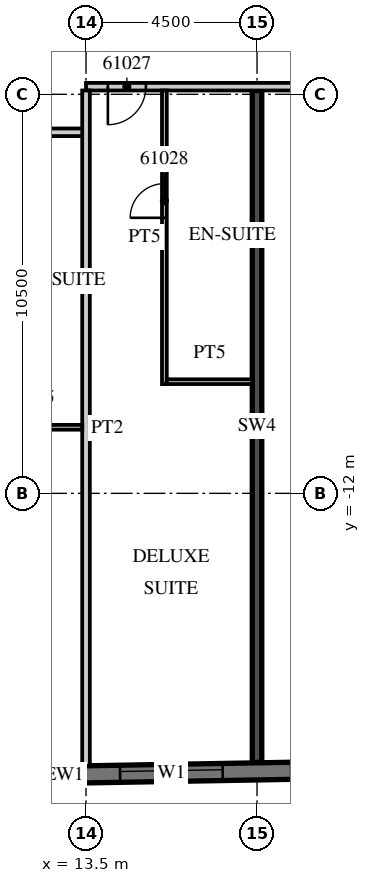
"""IFC4 building model, lengths in metres.
Left out: names, types, materials, properties, quantities, classifications, styles, units other than length and angle.
Written with IfcOpenShell. Run it as: python <this file> out.ifc"""

import sys

from ifc_helpers import new_model, si_unit, direction, frame, frame_2d, origin, place, context, subcontext, project, spatial, rectangle, extrude, element, fill, save


model = new_model("IFC4")
c1 = context("Model", 3, precision=1e-05, world=origin(), true_north=direction((0.0, 1.0)))
c2 = subcontext(c1, "Body", "Model", "MODEL_VIEW")
j1 = project(units=[si_unit("LENGTHUNIT", "METRE"), si_unit("PLANEANGLEUNIT", "RADIAN")], contexts=[c1])
p1 = place(None, origin())
s1 = spatial("IfcSite", under=j1, at=p1, CompositionType="ELEMENT")
p2 = place(p1, origin())
s2 = spatial("IfcBuilding", under=s1, at=p2, CompositionType="ELEMENT")
p3 = place(p2, frame((0.0, 0.0, 247.4)))
s3 = spatial("IfcBuildingStorey", under=s2, at=p3, CompositionType="ELEMENT", Elevation=247.4)
p4 = place(p3, frame((18.0, -19.079, 0.0), z_axis=(0.0, 0.0, 1.0), x_axis=(0.0, 1.0, 0.0)))
e1 = element("IfcWall", 1, at=p4, inside=s3, PredefinedType="SHEAR", context=c2, shape_type="SweptSolid", body=[
    extrude(rectangle(XDim=17.679, YDim=0.25, at=frame_2d((8.84, 0.0))), origin(), (0.0, 0.0, 1.0), 3.3),
])
p5 = place(p3, frame((-13.504, -19.866, 0.0), z_axis=(0.0, 0.0, 1.0), x_axis=(0.999847672978, 0.017453676992, 0.0)))
e2 = element("IfcWall", 2, at=p5, inside=s3, PredefinedType="SOLIDWALL", context=c2, shape_type="SweptSolid", body=[
    extrude(rectangle(XDim=52.86, YDim=0.45, at=frame_2d((26.43, 0.0))), origin(), (0.0, 0.0, 1.0), 3.02),
])
p6 = place(p5, frame((0.9, 0.0, 0.45)))
e3 = element("IfcOpeningElement", 3, at=p6, cuts=e2, PredefinedType="OPENING", context=c2, shape_type="SweptSolid", body=[
    extrude(rectangle(XDim=2.7, YDim=2.25, at=frame_2d((1.35, 1.125))), frame((0.0, 0.235, 0.0), z_axis=(0.0, -1.0, 0.0), x_axis=(1.0, 0.0, 0.0)), (0.0, 0.0, 1.0), 0.47),
])
p7 = place(p5, frame((5.401, 0.0, 0.45)))
e4 = element("IfcOpeningElement", 4, at=p7, cuts=e2, PredefinedType="OPENING", context=c2, shape_type="SweptSolid", body=[
    extrude(rectangle(XDim=2.7, YDim=2.25, at=frame_2d((1.35, 1.125))), frame((0.0, 0.235, 0.0), z_axis=(0.0, -1.0, 0.0), x_axis=(1.0, 0.0, 0.0)), (0.0, 0.0, 1.0), 0.47),
])
p8 = place(p5, frame((9.902, 0.0, 0.45)))
e5 = element("IfcOpeningElement", 5, at=p8, cuts=e2, PredefinedType="OPENING", context=c2, shape_type="SweptSolid", body=[
    extrude(rectangle(XDim=2.7, YDim=2.25, at=frame_2d((1.35, 1.125))), frame((0.0, 0.235, 0.0), z_axis=(0.0, -1.0, 0.0), x_axis=(1.0, 0.0, 0.0)), (0.0, 0.0, 1.0), 0.47),
])
p9 = place(p5, frame((14.402, 0.0, 0.45)))
e6 = element("IfcOpeningElement", 6, at=p9, cuts=e2, PredefinedType="OPENING", context=c2, shape_type="SweptSolid", body=[
    extrude(rectangle(XDim=2.7, YDim=2.25, at=frame_2d((1.35, 1.125))), frame((0.0, 0.235, 0.0), z_axis=(0.0, -1.0, 0.0), x_axis=(1.0, 0.0, 0.0)), (0.0, 0.0, 1.0), 0.47),
])
p10 = place(p5, frame((18.903, 0.0, 0.45)))
e7 = element("IfcOpeningElement", 7, at=p10, cuts=e2, PredefinedType="OPENING", context=c2, shape_type="SweptSolid", body=[
    extrude(rectangle(XDim=2.7, YDim=2.25, at=frame_2d((1.35, 1.125))), frame((0.0, 0.235, 0.0), z_axis=(0.0, -1.0, 0.0), x_axis=(1.0, 0.0, 0.0)), (0.0, 0.0, 1.0), 0.47),
])
p11 = place(p5, frame((23.404, 0.0, 0.45)))
e8 = element("IfcOpeningElement", 8, at=p11, cuts=e2, PredefinedType="OPENING", context=c2, shape_type="SweptSolid", body=[
    extrude(rectangle(XDim=2.7, YDim=2.25, at=frame_2d((1.35, 1.125))), frame((0.0, 0.235, 0.0), z_axis=(0.0, -1.0, 0.0), x_axis=(1.0, 0.0, 0.0)), (0.0, 0.0, 1.0), 0.47),
])
p12 = place(p5, frame((27.904, 0.0, 0.45)))
e9 = element("IfcOpeningElement", 9, at=p12, cuts=e2, PredefinedType="OPENING", context=c2, shape_type="SweptSolid", body=[
    extrude(rectangle(XDim=2.7, YDim=2.25, at=frame_2d((1.35, 1.125))), frame((0.0, 0.235, 0.0), z_axis=(0.0, -1.0, 0.0), x_axis=(1.0, 0.0, 0.0)), (0.0, 0.0, 1.0), 0.47),
])
p13 = place(p5, frame((32.405, 0.0, 0.45)))
e10 = element("IfcOpeningElement", 10, at=p13, cuts=e2, PredefinedType="OPENING", context=c2, shape_type="SweptSolid", body=[
    extrude(rectangle(XDim=2.7, YDim=2.25, at=frame_2d((1.35, 1.125))), frame((0.0, 0.235, 0.0), z_axis=(0.0, -1.0, 0.0), x_axis=(1.0, 0.0, 0.0)), (0.0, 0.0, 1.0), 0.47),
])
p14 = place(p5, frame((36.906, 0.0, 0.45)))
e11 = element("IfcOpeningElement", 11, at=p14, cuts=e2, PredefinedType="OPENING", context=c2, shape_type="SweptSolid", body=[
    extrude(rectangle(XDim=2.7, YDim=2.25, at=frame_2d((1.35, 1.125))), frame((0.0, 0.235, 0.0), z_axis=(0.0, -1.0, 0.0), x_axis=(1.0, 0.0, 0.0)), (0.0, 0.0, 1.0), 0.47),
])
p15 = place(p5, frame((41.406, 0.0, 0.45)))
e12 = element("IfcOpeningElement", 12, at=p15, cuts=e2, PredefinedType="OPENING", context=c2, shape_type="SweptSolid", body=[
    extrude(rectangle(XDim=2.7, YDim=2.25, at=frame_2d((1.35, 1.125))), frame((0.0, 0.235, 0.0), z_axis=(0.0, -1.0, 0.0), x_axis=(1.0, 0.0, 0.0)), (0.0, 0.0, 1.0), 0.47),
])
p16 = place(p5, frame((45.907, 0.0, 0.45)))
e13 = element("IfcOpeningElement", 13, at=p16, cuts=e2, PredefinedType="OPENING", context=c2, shape_type="SweptSolid", body=[
    extrude(rectangle(XDim=2.7, YDim=2.25, at=frame_2d((1.35, 1.125))), frame((0.0, 0.235, 0.0), z_axis=(0.0, -1.0, 0.0), x_axis=(1.0, 0.0, 0.0)), (0.0, 0.0, 1.0), 0.47),
])
p17 = place(p3, frame((-13.5, -2.5, 0.0), z_axis=(0.0, 0.0, 1.0), x_axis=(1.0, 0.0, 0.0)))
e14 = element("IfcWall", 14, at=p17, inside=s3, PredefinedType="PARTITIONING", context=c2, shape_type="SweptSolid", body=[
    extrude(rectangle(XDim=27.0, YDim=0.2, at=frame_2d((13.5, 0.0))), origin(), (0.0, 0.0, 1.0), 3.02),
])
p18 = place(p17, frame((2.925, 0.0, 0.0)))
e15 = element("IfcOpeningElement", 15, at=p18, cuts=e14, PredefinedType="OPENING", context=c2, shape_type="SweptSolid", body=[
    extrude(rectangle(XDim=1.0, YDim=2.1, at=frame_2d((0.5, 1.05))), frame((0.0, 0.11, 0.0), z_axis=(0.0, -1.0, 0.0), x_axis=(1.0, 0.0, 0.0)), (0.0, 0.0, 1.0), 0.22),
])
p19 = place(p17, frame((5.075, 0.0, 0.0)))
e16 = element("IfcOpeningElement", 16, at=p19, cuts=e14, PredefinedType="OPENING", context=c2, shape_type="SweptSolid", body=[
    extrude(rectangle(XDim=1.0, YDim=2.1, at=frame_2d((0.5, 1.05))), frame((0.0, 0.11, 0.0), z_axis=(0.0, -1.0, 0.0), x_axis=(1.0, 0.0, 0.0)), (0.0, 0.0, 1.0), 0.22),
])
p20 = place(p17, frame((9.55, 0.0, 0.0)))
e17 = element("IfcOpeningElement", 17, at=p20, cuts=e14, PredefinedType="OPENING", context=c2, shape_type="SweptSolid", body=[
    extrude(rectangle(XDim=1.0, YDim=2.1, at=frame_2d((0.5, 1.05))), frame((0.0, 0.11, 0.0), z_axis=(0.0, -1.0, 0.0), x_axis=(1.0, 0.0, 0.0)), (0.0, 0.0, 1.0), 0.22),
])
p21 = place(p17, frame((14.075, 0.0, 0.0)))
e18 = element("IfcOpeningElement", 18, at=p21, cuts=e14, PredefinedType="OPENING", context=c2, shape_type="SweptSolid", body=[
    extrude(rectangle(XDim=1.0, YDim=2.1, at=frame_2d((0.5, 1.05))), frame((0.0, 0.11, 0.0), z_axis=(0.0, -1.0, 0.0), x_axis=(1.0, 0.0, 0.0)), (0.0, 0.0, 1.0), 0.22),
])
p22 = place(p17, frame((20.925, 0.0, 0.0)))
e19 = element("IfcOpeningElement", 19, at=p22, cuts=e14, PredefinedType="OPENING", context=c2, shape_type="SweptSolid", body=[
    extrude(rectangle(XDim=1.0, YDim=2.1, at=frame_2d((0.5, 1.05))), frame((0.0, 0.11, 0.0), z_axis=(0.0, -1.0, 0.0), x_axis=(1.0, 0.0, 0.0)), (0.0, 0.0, 1.0), 0.22),
])
p23 = place(p17, frame((23.075, 0.0, 0.0)))
e20 = element("IfcOpeningElement", 20, at=p23, cuts=e14, PredefinedType="OPENING", context=c2, shape_type="SweptSolid", body=[
    extrude(rectangle(XDim=1.0, YDim=2.1, at=frame_2d((0.5, 1.05))), frame((0.0, 0.11, 0.0), z_axis=(0.0, -1.0, 0.0), x_axis=(1.0, 0.0, 0.0)), (0.0, 0.0, 1.0), 0.22),
])
p24 = place(p3, frame((13.5, -1.3, 0.0), z_axis=(0.0, 0.0, 1.0), x_axis=(1.0, 0.0, 0.0)))
e21 = element("IfcWall", 21, at=p24, inside=s3, PredefinedType="PARTITIONING", context=c2, shape_type="SweptSolid", body=[
    extrude(rectangle(XDim=29.091, YDim=0.2, at=frame_2d((14.545, 0.0))), origin(), (0.0, 0.0, 1.0), 3.02),
])
p25 = place(p24, frame((0.575, 0.0, 0.0)))
e22 = element("IfcOpeningElement", 22, at=p25, cuts=e21, PredefinedType="OPENING", context=c2, shape_type="SweptSolid", body=[
    extrude(rectangle(XDim=1.0, YDim=2.1, at=frame_2d((0.5, 1.05))), frame((0.0, 0.11, 0.0), z_axis=(0.0, -1.0, 0.0), x_axis=(1.0, 0.0, 0.0)), (0.0, 0.0, 1.0), 0.22),
])
p26 = place(p24, frame((6.938, 0.0, 0.0)))
e23 = element("IfcOpeningElement", 23, at=p26, cuts=e21, PredefinedType="OPENING", context=c2, shape_type="SweptSolid", body=[
    extrude(rectangle(XDim=1.2, YDim=2.1, at=frame_2d((0.6, 1.05))), frame((0.0, 0.11, 0.0), z_axis=(0.0, -1.0, 0.0), x_axis=(1.0, 0.0, 0.0)), (0.0, 0.0, 1.0), 0.22),
])
p27 = place(p24, frame((15.938, 0.0, 0.0)))
e24 = element("IfcOpeningElement", 24, at=p27, cuts=e21, PredefinedType="OPENING", context=c2, shape_type="SweptSolid", body=[
    extrude(rectangle(XDim=1.2, YDim=2.1, at=frame_2d((0.6, 1.05))), frame((0.0, 0.11, 0.0), z_axis=(0.0, -1.0, 0.0), x_axis=(1.0, 0.0, 0.0)), (0.0, 0.0, 1.0), 0.22),
])
p28 = place(p24, frame((25.425, 0.0, 0.0)))
e25 = element("IfcOpeningElement", 25, at=p28, cuts=e21, PredefinedType="OPENING", context=c2, shape_type="SweptSolid", body=[
    extrude(rectangle(XDim=1.0, YDim=2.1, at=frame_2d((0.5, 1.05))), frame((0.0, 0.11, 0.0), z_axis=(0.0, -1.0, 0.0), x_axis=(1.0, 0.0, 0.0)), (0.0, 0.0, 1.0), 0.22),
])
p29 = place(p24, frame((27.611, 0.0, 0.0)))
e26 = element("IfcOpeningElement", 26, at=p29, cuts=e21, PredefinedType="OPENING", context=c2, shape_type="SweptSolid", body=[
    extrude(rectangle(XDim=1.0, YDim=2.4, at=frame_2d((0.5, 1.2))), frame((0.0, 0.11, 0.0), z_axis=(0.0, -1.0, 0.0), x_axis=(1.0, 0.0, 0.0)), (0.0, 0.0, 1.0), 0.22),
])
p30 = place(p3, frame((13.5, -19.17, 0.0), z_axis=(0.0, 0.0, 1.0), x_axis=(0.0, 1.0, 0.0)))
e27 = element("IfcWall", 27, at=p30, inside=s3, PredefinedType="PARTITIONING", context=c2, shape_type="SweptSolid", body=[
    extrude(rectangle(XDim=17.77, YDim=0.2, at=frame_2d((8.885, 0.0))), origin(), (0.0, 0.0, 1.0), 3.02),
])
p31 = place(p3, frame((11.15, -10.262, 0.0), z_axis=(0.0, 0.0, 1.0), x_axis=(1.0, 0.0, 0.0)))
e28 = element("IfcWall", 28, at=p31, inside=s3, PredefinedType="PARTITIONING", context=c2, shape_type="SweptSolid", body=[
    extrude(rectangle(XDim=2.25, YDim=0.125, at=frame_2d((1.125, 0.0))), origin(), (0.0, 0.0, 1.0), 3.02),
])
p32 = place(p3, frame((15.562, -9.125, 0.0), z_axis=(0.0, 0.0, 1.0), x_axis=(0.0, 1.0, 0.0)))
e29 = element("IfcWall", 29, at=p32, inside=s3, PredefinedType="PARTITIONING", context=c2, shape_type="SweptSolid", body=[
    extrude(rectangle(XDim=7.725, YDim=0.125, at=frame_2d((3.863, 0.0))), origin(), (0.0, 0.0, 1.0), 3.02),
])
p33 = place(p32, frame((4.375, 0.0, 0.0)))
e30 = element("IfcOpeningElement", 30, at=p33, cuts=e29, PredefinedType="OPENING", context=c2, shape_type="SweptSolid", body=[
    extrude(rectangle(XDim=0.9, YDim=2.1, at=frame_2d((0.45, 1.05))), frame((0.0, 0.073, 0.0), z_axis=(0.0, -1.0, 0.0), x_axis=(1.0, 0.0, 0.0)), (0.0, 0.0, 1.0), 0.145),
])
p34 = place(p3, frame((15.625, -9.062, 0.0), z_axis=(0.0, 0.0, 1.0), x_axis=(1.0, 0.0, 0.0)))
e31 = element("IfcWall", 31, at=p34, inside=s3, PredefinedType="PARTITIONING", context=c2, shape_type="SweptSolid", body=[
    extrude(rectangle(XDim=2.25, YDim=0.125, at=frame_2d((1.125, 0.0))), origin(), (0.0, 0.0, 1.0), 3.02),
])
p35 = place(p12, origin())
e32 = element("IfcWindow", 32, at=p35, inside=s3, PartitioningType="SINGLE_PANEL", PredefinedType="WINDOW", context=c2, shape_type="SweptSolid", body=[
    extrude(rectangle(XDim=2.7, YDim=2.25, at=frame_2d((1.35, 1.125))), frame((0.0, 0.09, 0.0), z_axis=(0.0, -1.0, 0.0), x_axis=(1.0, 0.0, 0.0)), (0.0, 0.0, 1.0), 0.06),
])
fill(e9, e32)
p36 = place(p25, origin())
e33 = element("IfcDoor", 33, at=p36, inside=s3, OperationType="SINGLE_SWING_LEFT", PredefinedType="DOOR", context=c2, shape_type="SweptSolid", body=[
    extrude(rectangle(XDim=1.0, YDim=2.1, at=frame_2d((0.5, 1.05))), frame((0.0, 0.025, 0.0), z_axis=(0.0, -1.0, 0.0), x_axis=(1.0, 0.0, 0.0)), (0.0, 0.0, 1.0), 0.05),
])
fill(e22, e33)
p37 = place(p33, origin())
e34 = element("IfcDoor", 34, at=p37, inside=s3, OperationType="SINGLE_SWING_LEFT", PredefinedType="DOOR", context=c2, shape_type="SweptSolid", body=[
    extrude(rectangle(XDim=0.9, YDim=2.1, at=frame_2d((0.45, 1.05))), frame((0.0, 0.025, 0.0), z_axis=(0.0, -1.0, 0.0), x_axis=(1.0, 0.0, 0.0)), (0.0, 0.0, 1.0), 0.05),
])
fill(e30, e34)
save(model, sys.argv[1])
